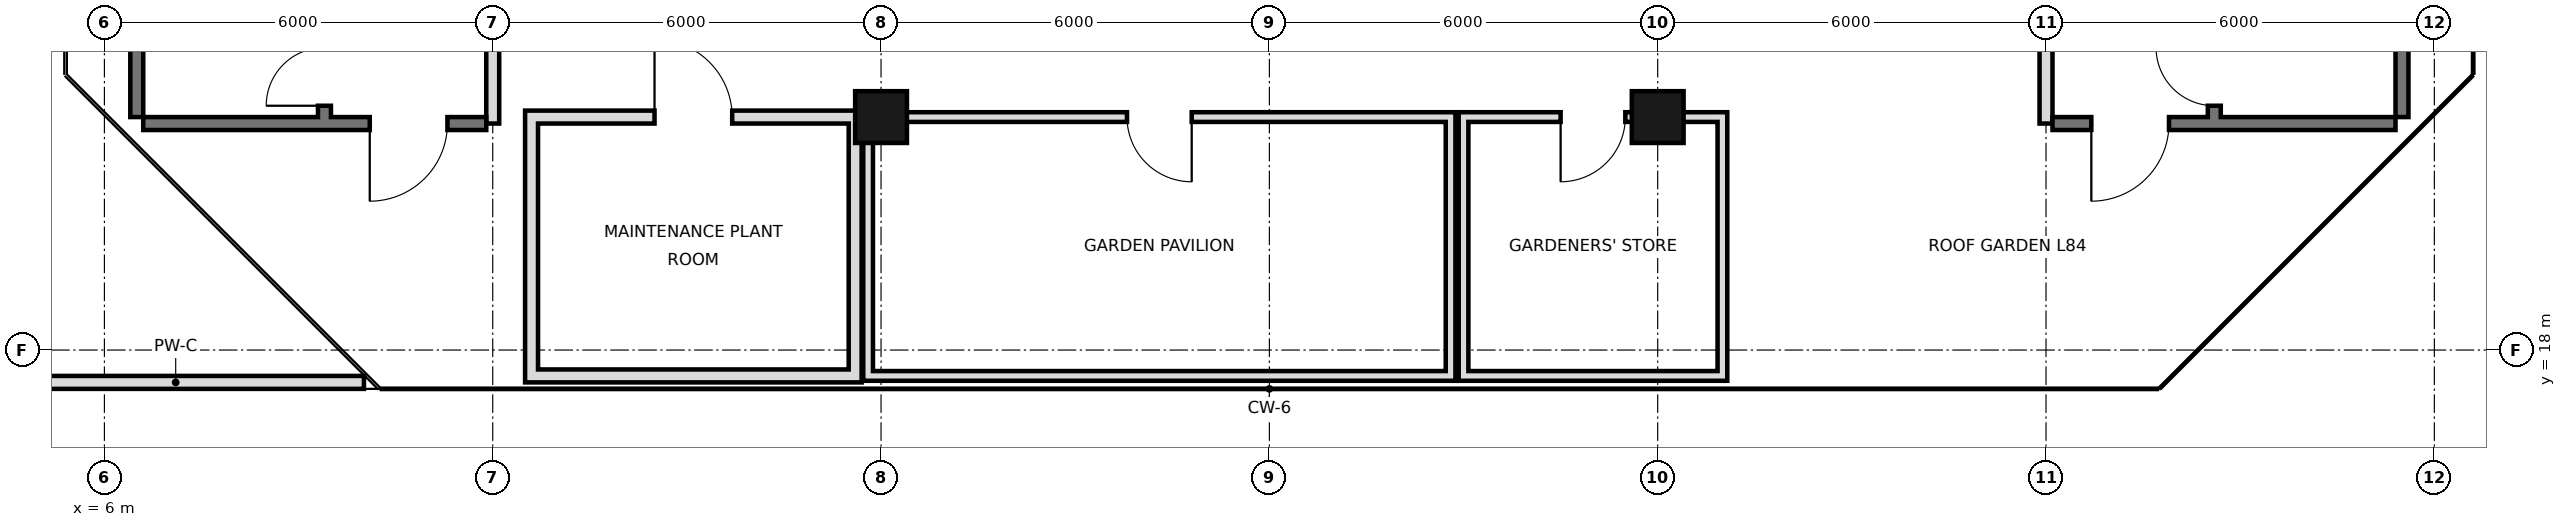
"""IFC4 building model, lengths in metres.
Left out: names, types, materials, properties, quantities, classifications, styles, units other than length and angle.
Written with IfcOpenShell. Run it as: python <this file> out.ifc"""

import sys

from ifc_helpers import new_model, si_unit, direction, frame, frame_2d, origin, origin_2d, place, context, subcontext, project, spatial, rectangle, hollow_rectangle, extrude, element, fill, save


model = new_model("IFC4")
c1 = context("Model", 3, precision=1e-05, world=origin(), true_north=direction((0.0, 1.0)))
c2 = subcontext(c1, "Body", "Model", "MODEL_VIEW")
j1 = project(units=[si_unit("LENGTHUNIT", "METRE"), si_unit("PLANEANGLEUNIT", "RADIAN")], contexts=[c1])
p1 = place(None, origin())
s1 = spatial("IfcSite", under=j1, at=p1, CompositionType="ELEMENT")
p2 = place(p1, origin())
s2 = spatial("IfcBuilding", under=s1, at=p2, CompositionType="ELEMENT")
p3 = place(p2, frame((0.0, 0.0, 353.8)))
s3 = spatial("IfcBuildingStorey", under=s2, at=p3, CompositionType="ELEMENT", Elevation=353.8)
for number, where, z_axis, x_axis in (
    (1, (18.0, 21.6, 0.0), (0.0, 0.0, 1.0), (1.0, 0.0, 0.0)),
    (2, (30.0, 21.6, 0.0), (0.0, 0.0, 1.0), (1.0, 0.0, 0.0)),
):
    element("IfcColumn", number, at=place(p3, frame(where, z_axis=z_axis, x_axis=x_axis)), inside=s3, PredefinedType="COLUMN", context=c2, shape_type="SweptSolid", body=[
        extrude(hollow_rectangle(XDim=0.8, YDim=0.8, WallThickness=0.025, at=origin_2d()), origin(), (0.0, 0.0, 1.0), 3.75),
    ])
p4 = place(p3, frame((10.01, 17.5, 0.0), z_axis=(0.0, 0.0, 1.0), x_axis=(-1.0, 0.0, 0.0)))
e3 = element("IfcWall", 3, at=p4, inside=s3, PredefinedType="PARAPET", context=c2, shape_type="SweptSolid", body=[
    extrude(rectangle(XDim=5.817, YDim=0.2, at=frame_2d((2.909, 0.0))), origin(), (0.0, 0.0, 1.0), 1.1),
])
for number, where, z_axis, x_axis in (
    (4, (12.6, 17.5, 0.0), (0.0, 0.0, 1.0), (0.0, 1.0, 0.0)),
    (5, (17.6, 17.5, 0.0), (0.0, 0.0, 1.0), (0.0, 1.0, 0.0)),
):
    element("IfcWall", number, at=place(p3, frame(where, z_axis=z_axis, x_axis=x_axis)), inside=s3, PredefinedType="SOLIDWALL", context=c2, shape_type="SweptSolid", body=[
        extrude(rectangle(XDim=4.2, YDim=0.2, at=frame_2d((2.1, 0.0))), origin(), (0.0, 0.0, 1.0), 3.75),
    ])
p5 = place(p3, frame((17.8, 17.525, 0.0), z_axis=(0.0, 0.0, 1.0), x_axis=(0.0, 1.0, 0.0)))
e6 = element("IfcWall", 6, at=p5, inside=s3, PredefinedType="PARTITIONING", context=c2, shape_type="SweptSolid", body=[
    extrude(rectangle(XDim=4.15, YDim=0.15, at=frame_2d((2.075, 0.0))), origin(), (0.0, 0.0, 1.0), 3.15),
])
for number, where, z_axis, x_axis in (
    (7, (26.8, 17.525, 0.0), (0.0, 0.0, 1.0), (0.0, 1.0, 0.0)),
    (8, (27.0, 17.525, 0.0), (0.0, 0.0, 1.0), (0.0, 1.0, 0.0)),
    (9, (31.0, 17.525, 0.0), (0.0, 0.0, 1.0), (0.0, 1.0, 0.0)),
):
    element("IfcWall", number, at=place(p3, frame(where, z_axis=z_axis, x_axis=x_axis)), inside=s3, PredefinedType="PARTITIONING", context=c2, shape_type="SweptSolid", body=[
        extrude(rectangle(XDim=4.15, YDim=0.15, at=frame_2d((2.075, 0.0))), origin(), (0.0, 0.0, 1.0), 3.75),
    ])
p6 = place(p3, frame((12.7, 17.6, 0.0), z_axis=(0.0, 0.0, 1.0), x_axis=(1.0, 0.0, 0.0)))
e10 = element("IfcWall", 10, at=p6, inside=s3, PredefinedType="SOLIDWALL", context=c2, shape_type="SweptSolid", body=[
    extrude(rectangle(XDim=4.8, YDim=0.2, at=frame_2d((2.4, 0.0))), origin(), (0.0, 0.0, 1.0), 3.75),
])
p7 = place(p3, frame((17.875, 17.6, 0.0), z_axis=(0.0, 0.0, 1.0), x_axis=(1.0, 0.0, 0.0)))
e11 = element("IfcWall", 11, at=p7, inside=s3, PredefinedType="PARTITIONING", context=c2, shape_type="SweptSolid", body=[
    extrude(rectangle(XDim=8.85, YDim=0.15, at=frame_2d((4.425, 0.0))), origin(), (0.0, 0.0, 1.0), 3.75),
])
p8 = place(p3, frame((27.075, 17.6, 0.0), z_axis=(0.0, 0.0, 1.0), x_axis=(1.0, 0.0, 0.0)))
e12 = element("IfcWall", 12, at=p8, inside=s3, PredefinedType="PARTITIONING", context=c2, shape_type="SweptSolid", body=[
    extrude(rectangle(XDim=3.85, YDim=0.15, at=frame_2d((1.925, 0.0))), origin(), (0.0, 0.0, 1.0), 3.75),
])
p9 = place(p3, frame((12.7, 21.6, 0.0), z_axis=(0.0, 0.0, 1.0), x_axis=(1.0, 0.0, 0.0)))
e13 = element("IfcWall", 13, at=p9, inside=s3, PredefinedType="SOLIDWALL", context=c2, shape_type="SweptSolid", body=[
    extrude(rectangle(XDim=4.8, YDim=0.2, at=frame_2d((2.4, 0.0))), origin(), (0.0, 0.0, 1.0), 3.75),
])
p10 = place(p9, frame((1.8, 0.0, 0.0)))
e14 = element("IfcOpeningElement", 14, at=p10, cuts=e13, PredefinedType="OPENING", context=c2, shape_type="SweptSolid", body=[
    extrude(rectangle(XDim=1.2, YDim=2.4, at=frame_2d((0.6, 1.2))), frame((0.0, 0.11, 0.0), z_axis=(0.0, -1.0, 0.0), x_axis=(1.0, 0.0, 0.0)), (0.0, 0.0, 1.0), 0.22),
])
p11 = place(p3, frame((17.875, 21.6, 0.0), z_axis=(0.0, 0.0, 1.0), x_axis=(1.0, 0.0, 0.0)))
e15 = element("IfcWall", 15, at=p11, inside=s3, PredefinedType="PARTITIONING", context=c2, shape_type="SweptSolid", body=[
    extrude(rectangle(XDim=8.85, YDim=0.15, at=frame_2d((4.425, 0.0))), origin(), (0.0, 0.0, 1.0), 3.75),
])
p12 = place(p11, frame((3.925, 0.0, 0.0)))
e16 = element("IfcOpeningElement", 16, at=p12, cuts=e15, PredefinedType="OPENING", context=c2, shape_type="SweptSolid", body=[
    extrude(rectangle(XDim=1.0, YDim=2.4, at=frame_2d((0.5, 1.2))), frame((0.0, 0.085, 0.0), z_axis=(0.0, -1.0, 0.0), x_axis=(1.0, 0.0, 0.0)), (0.0, 0.0, 1.0), 0.17),
])
p13 = place(p3, frame((27.075, 21.6, 0.0), z_axis=(0.0, 0.0, 1.0), x_axis=(1.0, 0.0, 0.0)))
e17 = element("IfcWall", 17, at=p13, inside=s3, PredefinedType="PARTITIONING", context=c2, shape_type="SweptSolid", body=[
    extrude(rectangle(XDim=3.85, YDim=0.15, at=frame_2d((1.925, 0.0))), origin(), (0.0, 0.0, 1.0), 3.75),
])
p14 = place(p13, frame((1.425, 0.0, 0.0)))
e18 = element("IfcOpeningElement", 18, at=p14, cuts=e17, PredefinedType="OPENING", context=c2, shape_type="SweptSolid", body=[
    extrude(rectangle(XDim=1.0, YDim=2.4, at=frame_2d((0.5, 1.2))), frame((0.0, 0.085, 0.0), z_axis=(0.0, -1.0, 0.0), x_axis=(1.0, 0.0, 0.0)), (0.0, 0.0, 1.0), 0.17),
])
for number, where, z_axis, x_axis in (
    (19, (6.5, 21.6, 0.0), (0.0, 0.0, 1.0), (0.0, 1.0, 0.0)),
    (20, (41.5, 21.6, 0.0), (0.0, 0.0, 1.0), (0.0, 1.0, 0.0)),
):
    element("IfcWall", number, at=place(p3, frame(where, z_axis=z_axis, x_axis=x_axis)), inside=s3, PredefinedType="SOLIDWALL", context=c2, shape_type="SweptSolid", body=[
        extrude(rectangle(XDim=23.5, YDim=0.2, at=frame_2d((11.75, 0.0))), origin(), (0.0, 0.0, 1.0), 3.75),
    ])
for number, where, z_axis, x_axis in (
    (21, (12.0, 21.5, 0.0), (0.0, 0.0, 1.0), (0.0, 1.0, 0.0)),
    (22, (36.0, 21.5, 0.0), (0.0, 0.0, 1.0), (0.0, 1.0, 0.0)),
):
    element("IfcWall", number, at=place(p3, frame(where, z_axis=z_axis, x_axis=x_axis)), inside=s3, PredefinedType="PARTITIONING", context=c2, shape_type="SweptSolid", body=[
        extrude(rectangle(XDim=6.2, YDim=0.2, at=frame_2d((3.1, 0.0))), origin(), (0.0, 0.0, 1.0), 3.75),
    ])
p15 = place(p3, frame((38.6, 21.5, 0.0), z_axis=(0.0, 0.0, 1.0), x_axis=(0.0, 1.0, 0.0)))
e23 = element("IfcWall", 23, at=p15, inside=s3, PredefinedType="SOLIDWALL", context=c2, shape_type="SweptSolid", body=[
    extrude(rectangle(XDim=23.5, YDim=0.2, at=frame_2d((11.75, 0.0))), origin(), (0.0, 0.0, 1.0), 3.75),
])
p16 = place(p15, frame((10.25, 0.0, 0.0)))
e24 = element("IfcOpeningElement", 24, at=p16, cuts=e23, PredefinedType="OPENING", context=c2, shape_type="SweptSolid", body=[
    extrude(rectangle(XDim=1.0, YDim=2.1, at=frame_2d((0.5, 1.05))), frame((0.0, 0.11, 0.0), z_axis=(0.0, -1.0, 0.0), x_axis=(1.0, 0.0, 0.0)), (0.0, 0.0, 1.0), 0.22),
])
p17 = place(p15, frame((15.8, 0.0, 0.0)))
e25 = element("IfcOpeningElement", 25, at=p17, cuts=e23, PredefinedType="OPENING", context=c2, shape_type="SweptSolid", body=[
    extrude(rectangle(XDim=1.0, YDim=2.1, at=frame_2d((0.5, 1.05))), frame((0.0, 0.11, 0.0), z_axis=(0.0, -1.0, 0.0), x_axis=(1.0, 0.0, 0.0)), (0.0, 0.0, 1.0), 0.22),
])
p18 = place(p15, frame((0.275, 0.0, 0.0)))
e26 = element("IfcOpeningElement", 26, at=p18, cuts=e23, PredefinedType="OPENING", context=c2, shape_type="SweptSolid", body=[
    extrude(rectangle(XDim=0.9, YDim=2.1, at=frame_2d((0.45, 1.05))), frame((0.0, 0.11, 0.0), z_axis=(0.0, -1.0, 0.0), x_axis=(1.0, 0.0, 0.0)), (0.0, 0.0, 1.0), 0.22),
])
p19 = place(p3, frame((9.4, 21.5, 0.0), z_axis=(0.0, 0.0, 1.0), x_axis=(0.0, 1.0, 0.0)))
e27 = element("IfcWall", 27, at=p19, inside=s3, PredefinedType="SOLIDWALL", context=c2, shape_type="SweptSolid", body=[
    extrude(rectangle(XDim=23.5, YDim=0.2, at=frame_2d((11.75, 0.0))), origin(), (0.0, 0.0, 1.0), 3.75),
])
p20 = place(p19, frame((8.05, 0.0, 0.0)))
e28 = element("IfcOpeningElement", 28, at=p20, cuts=e27, PredefinedType="OPENING", context=c2, shape_type="SweptSolid", body=[
    extrude(rectangle(XDim=1.0, YDim=2.1, at=frame_2d((0.5, 1.05))), frame((0.0, 0.11, 0.0), z_axis=(0.0, -1.0, 0.0), x_axis=(1.0, 0.0, 0.0)), (0.0, 0.0, 1.0), 0.22),
])
p21 = place(p19, frame((12.7, 0.0, 0.0)))
e29 = element("IfcOpeningElement", 29, at=p21, cuts=e27, PredefinedType="OPENING", context=c2, shape_type="SweptSolid", body=[
    extrude(rectangle(XDim=1.0, YDim=2.1, at=frame_2d((0.5, 1.05))), frame((0.0, 0.11, 0.0), z_axis=(0.0, -1.0, 0.0), x_axis=(1.0, 0.0, 0.0)), (0.0, 0.0, 1.0), 0.22),
])
p22 = place(p19, frame((15.8, 0.0, 0.0)))
e30 = element("IfcOpeningElement", 30, at=p22, cuts=e27, PredefinedType="OPENING", context=c2, shape_type="SweptSolid", body=[
    extrude(rectangle(XDim=1.0, YDim=2.1, at=frame_2d((0.5, 1.05))), frame((0.0, 0.11, 0.0), z_axis=(0.0, -1.0, 0.0), x_axis=(1.0, 0.0, 0.0)), (0.0, 0.0, 1.0), 0.22),
])
p23 = place(p19, frame((0.275, 0.0, 0.0)))
e31 = element("IfcOpeningElement", 31, at=p23, cuts=e27, PredefinedType="OPENING", context=c2, shape_type="SweptSolid", body=[
    extrude(rectangle(XDim=0.9, YDim=2.1, at=frame_2d((0.45, 1.05))), frame((0.0, 0.11, 0.0), z_axis=(0.0, -1.0, 0.0), x_axis=(1.0, 0.0, 0.0)), (0.0, 0.0, 1.0), 0.22),
])
p24 = place(p3, frame((36.1, 21.5, 0.0), z_axis=(0.0, 0.0, 1.0), x_axis=(1.0, 0.0, 0.0)))
e32 = element("IfcWall", 32, at=p24, inside=s3, PredefinedType="SOLIDWALL", context=c2, shape_type="SweptSolid", body=[
    extrude(rectangle(XDim=5.3, YDim=0.2, at=frame_2d((2.65, 0.0))), origin(), (0.0, 0.0, 1.0), 3.75),
])
p25 = place(p24, frame((0.6, 0.0, 0.0)))
e33 = element("IfcOpeningElement", 33, at=p25, cuts=e32, PredefinedType="OPENING", context=c2, shape_type="SweptSolid", body=[
    extrude(rectangle(XDim=1.2, YDim=2.1, at=frame_2d((0.6, 1.05))), frame((0.0, 0.11, 0.0), z_axis=(0.0, -1.0, 0.0), x_axis=(1.0, 0.0, 0.0)), (0.0, 0.0, 1.0), 0.22),
])
p26 = place(p3, frame((6.6, 21.5, 0.0), z_axis=(0.0, 0.0, 1.0), x_axis=(1.0, 0.0, 0.0)))
e34 = element("IfcWall", 34, at=p26, inside=s3, PredefinedType="SOLIDWALL", context=c2, shape_type="SweptSolid", body=[
    extrude(rectangle(XDim=5.3, YDim=0.2, at=frame_2d((2.65, 0.0))), origin(), (0.0, 0.0, 1.0), 3.75),
])
p27 = place(p26, frame((3.5, 0.0, 0.0)))
e35 = element("IfcOpeningElement", 35, at=p27, cuts=e34, PredefinedType="OPENING", context=c2, shape_type="SweptSolid", body=[
    extrude(rectangle(XDim=1.2, YDim=2.1, at=frame_2d((0.6, 1.05))), frame((0.0, 0.11, 0.0), z_axis=(0.0, -1.0, 0.0), x_axis=(1.0, 0.0, 0.0)), (0.0, 0.0, 1.0), 0.22),
])
p28 = place(p10, origin())
e36 = element("IfcDoor", 36, at=p28, inside=s3, OperationType="SINGLE_SWING_LEFT", PredefinedType="DOOR", context=c2, shape_type="SweptSolid", body=[
    extrude(rectangle(XDim=1.2, YDim=2.4, at=frame_2d((0.6, 1.2))), frame((0.0, 0.025, 0.0), z_axis=(0.0, -1.0, 0.0), x_axis=(1.0, 0.0, 0.0)), (0.0, 0.0, 1.0), 0.05),
])
fill(e14, e36)
p29 = place(p12, origin())
e37 = element("IfcDoor", 37, at=p29, inside=s3, OperationType="SINGLE_SWING_RIGHT", PredefinedType="DOOR", context=c2, shape_type="SweptSolid", body=[
    extrude(rectangle(XDim=1.0, YDim=2.4, at=frame_2d((0.5, 1.2))), frame((0.0, 0.025, 0.0), z_axis=(0.0, -1.0, 0.0), x_axis=(1.0, 0.0, 0.0)), (0.0, 0.0, 1.0), 0.05),
])
fill(e16, e37)
p30 = place(p14, frame((1.0, 0.0, 0.0), z_axis=(0.0, 0.0, 1.0), x_axis=(-1.0, 0.0, 0.0)))
e38 = element("IfcDoor", 38, at=p30, inside=s3, OperationType="SINGLE_SWING_RIGHT", PredefinedType="DOOR", context=c2, shape_type="SweptSolid", body=[
    extrude(rectangle(XDim=1.0, YDim=2.4, at=frame_2d((0.5, 1.2))), frame((0.0, 0.025, 0.0), z_axis=(0.0, -1.0, 0.0), x_axis=(1.0, 0.0, 0.0)), (0.0, 0.0, 1.0), 0.05),
])
fill(e18, e38)
p31 = place(p27, frame((1.2, 0.0, 0.0), z_axis=(0.0, 0.0, 1.0), x_axis=(-1.0, 0.0, 0.0)))
e39 = element("IfcDoor", 39, at=p31, inside=s3, OperationType="SINGLE_SWING_RIGHT", PredefinedType="DOOR", context=c2, shape_type="SweptSolid", body=[
    extrude(rectangle(XDim=1.2, YDim=2.1, at=frame_2d((0.6, 1.05))), frame((0.0, 0.025, 0.0), z_axis=(0.0, -1.0, 0.0), x_axis=(1.0, 0.0, 0.0)), (0.0, 0.0, 1.0), 0.05),
])
fill(e35, e39)
p32 = place(p25, frame((1.2, 0.0, 0.0), z_axis=(0.0, 0.0, 1.0), x_axis=(-1.0, 0.0, 0.0)))
e40 = element("IfcDoor", 40, at=p32, inside=s3, OperationType="SINGLE_SWING_RIGHT", PredefinedType="DOOR", context=c2, shape_type="SweptSolid", body=[
    extrude(rectangle(XDim=1.2, YDim=2.1, at=frame_2d((0.6, 1.05))), frame((0.0, 0.025, 0.0), z_axis=(0.0, -1.0, 0.0), x_axis=(1.0, 0.0, 0.0)), (0.0, 0.0, 1.0), 0.05),
])
fill(e33, e40)
p33 = place(p23, origin())
e41 = element("IfcDoor", 41, at=p33, inside=s3, OperationType="SINGLE_SWING_LEFT", PredefinedType="DOOR", context=c2, shape_type="SweptSolid", body=[
    extrude(rectangle(XDim=0.9, YDim=2.1, at=frame_2d((0.45, 1.05))), frame((0.0, 0.025, 0.0), z_axis=(0.0, -1.0, 0.0), x_axis=(1.0, 0.0, 0.0)), (0.0, 0.0, 1.0), 0.05),
])
fill(e31, e41)
p34 = place(p18, frame((0.9, 0.0, 0.0), z_axis=(0.0, 0.0, 1.0), x_axis=(-1.0, 0.0, 0.0)))
e42 = element("IfcDoor", 42, at=p34, inside=s3, OperationType="SINGLE_SWING_LEFT", PredefinedType="DOOR", context=c2, shape_type="SweptSolid", body=[
    extrude(rectangle(XDim=0.9, YDim=2.1, at=frame_2d((0.45, 1.05))), frame((0.0, 0.025, 0.0), z_axis=(0.0, -1.0, 0.0), x_axis=(1.0, 0.0, 0.0)), (0.0, 0.0, 1.0), 0.05),
])
fill(e26, e42)
save(model, sys.argv[1])
